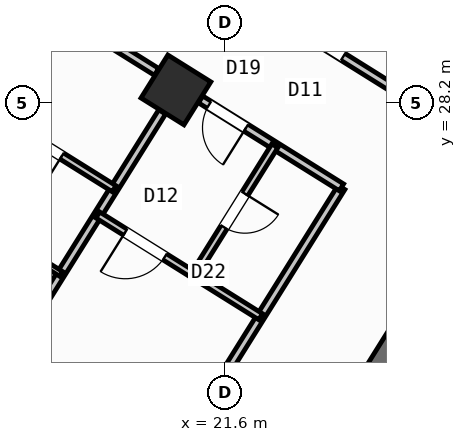
"""IFC4 building model, lengths in metres.
Left out: names, types, materials, properties, quantities, classifications, styles, units other than length and angle.
Written with IfcOpenShell. Run it as: python <this file> out.ifc"""

import sys

from ifc_helpers import new_model, si_unit, direction, frame, frame_2d, origin, origin_2d, place, context, subcontext, project, spatial, rectangle, hollow_rectangle, extrude, source, transform, mapped, element, fill, save


model = new_model("IFC4")
c1 = context("Model", 3, precision=1e-05, world=origin(), true_north=direction((0.0, 1.0)))
c2 = subcontext(c1, "Body", "Model", "MODEL_VIEW")
j1 = project(units=[si_unit("LENGTHUNIT", "METRE"), si_unit("PLANEANGLEUNIT", "RADIAN")], contexts=[c1])
p1 = place(None, origin())
s1 = spatial("IfcSite", under=j1, at=p1, CompositionType="ELEMENT")
p2 = place(p1, origin())
s2 = spatial("IfcBuilding", under=s1, at=p2, CompositionType="ELEMENT")
p3 = place(p2, frame((0.0, 0.0, 67.2)))
s3 = spatial("IfcBuildingStorey", under=s2, at=p3, CompositionType="ELEMENT", Elevation=67.2)
p4 = place(p3, frame((26.007, 24.976, 0.0), z_axis=(0.0, 0.0, 1.0), x_axis=(-0.529916319127, -0.848049936456, 0.0)))
e1 = element("IfcWall", 1, at=p4, inside=s3, PredefinedType="SHEAR", context=c2, shape_type="SweptSolid", body=[
    extrude(rectangle(XDim=6.375, YDim=0.65, at=frame_2d((3.188, 0.0))), origin(), (0.0, 0.0, 1.0), 4.22),
])
m1 = source(origin(), c2, "Body", "SweptSolid", [
    extrude(hollow_rectangle(XDim=1.0, YDim=1.0, WallThickness=0.04, at=origin_2d()), origin(), (0.0, 0.0, 1.0), 4.5),
])
p5 = place(p3, frame((20.632, 28.452, 0.0), z_axis=(0.0, 0.0, 1.0), x_axis=(-0.848048096156, 0.529919264233, 0.0)))
e2 = element("IfcColumn", 2, at=p5, inside=s3, PredefinedType="COLUMN", context=c2, shape_type="MappedRepresentation", body=[
    mapped(m1, transform((0.0, 0.0, 0.0), scale=1.0)),
])
p6 = place(p3, frame((29.268, 6.429, 0.0), z_axis=(0.0, 0.0, 1.0), x_axis=(-0.848049971435, 0.529916263149, 0.0)))
e3 = element("IfcWall", 3, at=p6, inside=s3, PredefinedType="STANDARD", context=c2, shape_type="SweptSolid", body=[
    extrude(rectangle(XDim=31.588, YDim=0.32, at=frame_2d((15.794, 0.0))), origin(), (0.0, 0.0, 1.0), 4.22),
])
p7 = place(p6, frame((16.362, 0.0, 0.0)))
e4 = element("IfcOpeningElement", 4, at=p7, cuts=e3, PredefinedType="OPENING", context=c2, shape_type="SweptSolid", body=[
    extrude(rectangle(XDim=1.2, YDim=2.15, at=frame_2d((0.6, 1.075))), frame((0.0, 0.17, 0.0), z_axis=(0.0, -1.0, 0.0), x_axis=(1.0, 0.0, 0.0)), (0.0, 0.0, 1.0), 0.34),
])
p8 = place(p6, frame((2.989, 0.0, 0.8)))
e5 = element("IfcOpeningElement", 5, at=p8, cuts=e3, PredefinedType="OPENING", context=c2, shape_type="SweptSolid", body=[
    extrude(rectangle(XDim=2.1, YDim=1.55, at=frame_2d((1.05, 0.775))), frame((0.0, 0.17, 0.0), z_axis=(0.0, -1.0, 0.0), x_axis=(1.0, 0.0, 0.0)), (0.0, 0.0, 1.0), 0.34),
])
p9 = place(p6, frame((8.359, 0.0, 0.8)))
e6 = element("IfcOpeningElement", 6, at=p9, cuts=e3, PredefinedType="OPENING", context=c2, shape_type="SweptSolid", body=[
    extrude(rectangle(XDim=2.1, YDim=1.55, at=frame_2d((1.05, 0.775))), frame((0.0, 0.17, 0.0), z_axis=(0.0, -1.0, 0.0), x_axis=(1.0, 0.0, 0.0)), (0.0, 0.0, 1.0), 0.34),
])
p10 = place(p6, frame((13.284, 0.0, 0.95)))
e7 = element("IfcOpeningElement", 7, at=p10, cuts=e3, PredefinedType="OPENING", context=c2, shape_type="SweptSolid", body=[
    extrude(rectangle(XDim=1.2, YDim=1.4, at=frame_2d((0.6, 0.7))), frame((0.0, 0.17, 0.0), z_axis=(0.0, -1.0, 0.0), x_axis=(1.0, 0.0, 0.0)), (0.0, 0.0, 1.0), 0.34),
])
p11 = place(p6, frame((29.188, 0.0, 0.95)))
e8 = element("IfcOpeningElement", 8, at=p11, cuts=e3, PredefinedType="OPENING", context=c2, shape_type="SweptSolid", body=[
    extrude(rectangle(XDim=1.2, YDim=1.4, at=frame_2d((0.6, 0.7))), frame((0.0, 0.17, 0.0), z_axis=(0.0, -1.0, 0.0), x_axis=(1.0, 0.0, 0.0)), (0.0, 0.0, 1.0), 0.34),
])
p12 = place(p6, frame((19.11, 0.0, 1.0)))
e9 = element("IfcOpeningElement", 9, at=p12, cuts=e3, PredefinedType="OPENING", context=c2, shape_type="SweptSolid", body=[
    extrude(rectangle(XDim=0.9, YDim=1.25, at=frame_2d((0.45, 0.625))), frame((0.0, 0.17, 0.0), z_axis=(0.0, -1.0, 0.0), x_axis=(1.0, 0.0, 0.0)), (0.0, 0.0, 1.0), 0.34),
])
p13 = place(p6, frame((21.226, 0.0, 1.0)))
e10 = element("IfcOpeningElement", 10, at=p13, cuts=e3, PredefinedType="OPENING", context=c2, shape_type="SweptSolid", body=[
    extrude(rectangle(XDim=0.9, YDim=1.25, at=frame_2d((0.45, 0.625))), frame((0.0, 0.17, 0.0), z_axis=(0.0, -1.0, 0.0), x_axis=(1.0, 0.0, 0.0)), (0.0, 0.0, 1.0), 0.34),
])
p14 = place(p6, frame((23.014, 0.0, 1.0)))
e11 = element("IfcOpeningElement", 11, at=p14, cuts=e3, PredefinedType="OPENING", context=c2, shape_type="SweptSolid", body=[
    extrude(rectangle(XDim=0.9, YDim=1.25, at=frame_2d((0.45, 0.625))), frame((0.0, 0.17, 0.0), z_axis=(0.0, -1.0, 0.0), x_axis=(1.0, 0.0, 0.0)), (0.0, 0.0, 1.0), 0.34),
])
p15 = place(p6, frame((24.802, 0.0, 1.0)))
e12 = element("IfcOpeningElement", 12, at=p15, cuts=e3, PredefinedType="OPENING", context=c2, shape_type="SweptSolid", body=[
    extrude(rectangle(XDim=0.9, YDim=1.25, at=frame_2d((0.45, 0.625))), frame((0.0, 0.17, 0.0), z_axis=(0.0, -1.0, 0.0), x_axis=(1.0, 0.0, 0.0)), (0.0, 0.0, 1.0), 0.34),
])
p16 = place(p6, frame((26.59, 0.0, 1.0)))
e13 = element("IfcOpeningElement", 13, at=p16, cuts=e3, PredefinedType="OPENING", context=c2, shape_type="SweptSolid", body=[
    extrude(rectangle(XDim=0.9, YDim=1.25, at=frame_2d((0.45, 0.625))), frame((0.0, 0.17, 0.0), z_axis=(0.0, -1.0, 0.0), x_axis=(1.0, 0.0, 0.0)), (0.0, 0.0, 1.0), 0.34),
])
p17 = place(p3, frame((14.138, 41.825, 0.0), z_axis=(0.0, 0.0, 1.0), x_axis=(0.848046498049, -0.529921821731, 0.0)))
e14 = element("IfcWall", 14, at=p17, inside=s3, PredefinedType="STANDARD", context=c2, shape_type="SweptSolid", body=[
    extrude(rectangle(XDim=31.588, YDim=0.32, at=frame_2d((15.794, 0.0))), origin(), (0.0, 0.0, 1.0), 4.22),
])
p18 = place(p17, frame((2.526, 0.0, 0.0)))
e15 = element("IfcOpeningElement", 15, at=p18, cuts=e14, PredefinedType="OPENING", context=c2, shape_type="SweptSolid", body=[
    extrude(rectangle(XDim=1.05, YDim=2.15, at=frame_2d((0.525, 1.075))), frame((0.0, 0.17, 0.0), z_axis=(0.0, -1.0, 0.0), x_axis=(1.0, 0.0, 0.0)), (0.0, 0.0, 1.0), 0.34),
])
p19 = place(p17, frame((9.364, 0.0, 0.95)))
e16 = element("IfcOpeningElement", 16, at=p19, cuts=e14, PredefinedType="OPENING", context=c2, shape_type="SweptSolid", body=[
    extrude(rectangle(XDim=1.2, YDim=1.4, at=frame_2d((0.6, 0.7))), frame((0.0, 0.17, 0.0), z_axis=(0.0, -1.0, 0.0), x_axis=(1.0, 0.0, 0.0)), (0.0, 0.0, 1.0), 0.34),
])
p20 = place(p17, frame((14.636, 0.0, 1.0)))
e17 = element("IfcOpeningElement", 17, at=p20, cuts=e14, PredefinedType="OPENING", context=c2, shape_type="SweptSolid", body=[
    extrude(rectangle(XDim=0.9, YDim=1.25, at=frame_2d((0.45, 0.625))), frame((0.0, 0.17, 0.0), z_axis=(0.0, -1.0, 0.0), x_axis=(1.0, 0.0, 0.0)), (0.0, 0.0, 1.0), 0.34),
])
p21 = place(p17, frame((22.306, 0.0, 0.85)))
e18 = element("IfcOpeningElement", 18, at=p21, cuts=e14, PredefinedType="OPENING", context=c2, shape_type="SweptSolid", body=[
    extrude(rectangle(XDim=1.5, YDim=1.5, at=frame_2d((0.75, 0.75))), frame((0.0, 0.17, 0.0), z_axis=(0.0, -1.0, 0.0), x_axis=(1.0, 0.0, 0.0)), (0.0, 0.0, 1.0), 0.34),
])
p22 = place(p17, frame((26.981, 0.0, 0.85)))
e19 = element("IfcOpeningElement", 19, at=p22, cuts=e14, PredefinedType="OPENING", context=c2, shape_type="SweptSolid", body=[
    extrude(rectangle(XDim=1.5, YDim=1.5, at=frame_2d((0.75, 0.75))), frame((0.0, 0.17, 0.0), z_axis=(0.0, -1.0, 0.0), x_axis=(1.0, 0.0, 0.0)), (0.0, 0.0, 1.0), 0.34),
])
p23 = place(p3, frame((23.899, 26.529, 0.0), z_axis=(0.0, 0.0, 1.0), x_axis=(-0.529917716469, -0.848049063305, 0.0)))
e20 = element("IfcWall", 20, at=p23, inside=s3, PredefinedType="PARTITIONING", context=c2, shape_type="SweptSolid", body=[
    extrude(rectangle(XDim=14.05, YDim=0.16, at=frame_2d((7.025, 0.0))), origin(), (0.0, 0.0, 1.0), 4.21),
])
p24 = place(p3, frame((25.065, 28.394, 0.0), z_axis=(0.0, 0.0, 1.0), x_axis=(-0.848048310262, 0.529918921593, 0.0)))
e21 = element("IfcWall", 21, at=p24, inside=s3, PredefinedType="PARTITIONING", context=c2, shape_type="SweptSolid", body=[
    extrude(rectangle(XDim=16.73, YDim=0.16, at=frame_2d((8.365, 0.0))), origin(), (0.0, 0.0, 1.0), 4.21),
])
p25 = place(p24, frame((1.338, 0.0, 0.0)))
e22 = element("IfcOpeningElement", 22, at=p25, cuts=e21, PredefinedType="OPENING", context=c2, shape_type="SweptSolid", body=[
    extrude(rectangle(XDim=1.0, YDim=2.1, at=frame_2d((0.5, 1.05))), frame((0.0, 0.09, 0.0), z_axis=(0.0, -1.0, 0.0), x_axis=(1.0, 0.0, 0.0)), (0.0, 0.0, 1.0), 0.18),
])
p26 = place(p24, frame((5.265, 0.0, 0.0)))
e23 = element("IfcOpeningElement", 23, at=p26, cuts=e21, PredefinedType="OPENING", context=c2, shape_type="SweptSolid", body=[
    extrude(rectangle(XDim=1.0, YDim=2.1, at=frame_2d((0.5, 1.05))), frame((0.0, 0.09, 0.0), z_axis=(0.0, -1.0, 0.0), x_axis=(1.0, 0.0, 0.0)), (0.0, 0.0, 1.0), 0.18),
])
p27 = place(p24, frame((9.526, 0.0, 0.0)))
e24 = element("IfcOpeningElement", 24, at=p27, cuts=e21, PredefinedType="OPENING", context=c2, shape_type="SweptSolid", body=[
    extrude(rectangle(XDim=1.0, YDim=2.1, at=frame_2d((0.5, 1.05))), frame((0.0, 0.09, 0.0), z_axis=(0.0, -1.0, 0.0), x_axis=(1.0, 0.0, 0.0)), (0.0, 0.0, 1.0), 0.18),
])
p28 = place(p24, frame((13.954, 0.0, 0.0)))
e25 = element("IfcOpeningElement", 25, at=p28, cuts=e21, PredefinedType="OPENING", context=c2, shape_type="SweptSolid", body=[
    extrude(rectangle(XDim=1.0, YDim=2.1, at=frame_2d((0.5, 1.05))), frame((0.0, 0.09, 0.0), z_axis=(0.0, -1.0, 0.0), x_axis=(1.0, 0.0, 0.0)), (0.0, 0.0, 1.0), 0.18),
])
p29 = place(p3, frame((23.899, 26.529, 0.0), z_axis=(0.0, 0.0, 1.0), x_axis=(-0.848061058944, 0.529898518871, 0.0)))
e26 = element("IfcWall", 26, at=p29, inside=s3, PredefinedType="PARTITIONING", context=c2, shape_type="SweptSolid", body=[
    extrude(rectangle(XDim=3.278, YDim=0.16, at=frame_2d((1.639, 0.0))), origin(), (0.0, 0.0, 1.0), 3.595),
])
p30 = place(p29, frame((2.22, 0.0, 0.0)))
e27 = element("IfcOpeningElement", 27, at=p30, cuts=e26, PredefinedType="OPENING", context=c2, shape_type="SweptSolid", body=[
    extrude(rectangle(XDim=0.86, YDim=2.05, at=frame_2d((0.43, 1.025))), frame((0.0, 0.09, 0.0), z_axis=(0.0, -1.0, 0.0), x_axis=(1.0, 0.0, 0.0)), (0.0, 0.0, 1.0), 0.18),
])
p31 = place(p3, frame((20.251, 28.808, 0.0), z_axis=(0.0, 0.0, 1.0), x_axis=(-0.848044224181, 0.529925460639, 0.0)))
e28 = element("IfcWall", 28, at=p31, inside=s3, PredefinedType="PARTITIONING", context=c2, shape_type="SweptSolid", body=[
    extrude(rectangle(XDim=5.376, YDim=0.16, at=frame_2d((2.688, 0.0))), origin(), (0.0, 0.0, 1.0), 3.595),
])
p32 = place(p3, frame((20.361, 28.018, 0.0), z_axis=(0.0, 0.0, 1.0), x_axis=(-0.529915015264, -0.848050751193, 0.0)))
e29 = element("IfcWall", 29, at=p32, inside=s3, PredefinedType="PARTITIONING", context=c2, shape_type="SweptSolid", body=[
    extrude(rectangle(XDim=6.276, YDim=0.16, at=frame_2d((3.138, 0.0))), origin(), (0.0, 0.0, 1.0), 2.395),
])
p33 = place(p3, frame((22.304, 23.976, 0.0), z_axis=(0.0, 0.0, 1.0), x_axis=(-0.84803087207, 0.529946827537, 0.0)))
e30 = element("IfcWall", 30, at=p33, inside=s3, PredefinedType="PLUMBINGWALL", context=c2, shape_type="SweptSolid", body=[
    extrude(rectangle(XDim=3.79, YDim=0.14, at=frame_2d((1.895, 0.0))), origin(), (0.0, 0.0, 1.0), 4.21),
])
p34 = place(p33, frame((2.23, 0.0, 0.0)))
e31 = element("IfcOpeningElement", 31, at=p34, cuts=e30, PredefinedType="OPENING", context=c2, shape_type="SweptSolid", body=[
    extrude(rectangle(XDim=0.92, YDim=2.08, at=frame_2d((0.46, 1.04))), frame((0.0, 0.08, 0.0), z_axis=(0.0, -1.0, 0.0), x_axis=(1.0, 0.0, 0.0)), (0.0, 0.0, 1.0), 0.16),
])
p35 = place(p3, frame((22.585, 27.35, 0.0), z_axis=(0.0, 0.0, 1.0), x_axis=(-0.529977067289, -0.848011974059, 0.0)))
e32 = element("IfcWall", 32, at=p35, inside=s3, PredefinedType="PLUMBINGWALL", context=c2, shape_type="SweptSolid", body=[
    extrude(rectangle(XDim=3.01, YDim=0.14, at=frame_2d((1.505, 0.0))), origin(), (0.0, 0.0, 1.0), 3.865),
])
p36 = place(p35, frame((1.115, 0.0, 0.0)))
e33 = element("IfcOpeningElement", 33, at=p36, cuts=e32, PredefinedType="OPENING", context=c2, shape_type="SweptSolid", body=[
    extrude(rectangle(XDim=0.78, YDim=2.05, at=frame_2d((0.39, 1.025))), frame((0.0, 0.08, 0.0), z_axis=(0.0, -1.0, 0.0), x_axis=(1.0, 0.0, 0.0)), (0.0, 0.0, 1.0), 0.16),
])
p37 = place(p3, frame((19.413, 26.501, 0.0), z_axis=(0.0, 0.0, 1.0), x_axis=(-0.848051995289, 0.529913024266, 0.0)))
e34 = element("IfcWall", 34, at=p37, inside=s3, PredefinedType="PLUMBINGWALL", context=c2, shape_type="SweptSolid", body=[
    extrude(rectangle(XDim=8.94, YDim=0.14, at=frame_2d((4.47, 0.0))), origin(), (0.0, 0.0, 1.0), 4.21),
])
p38 = place(p37, frame((5.688, 0.0, 0.0)))
e35 = element("IfcOpeningElement", 35, at=p38, cuts=e34, PredefinedType="OPENING", context=c2, shape_type="SweptSolid", body=[
    extrude(rectangle(XDim=0.78, YDim=2.05, at=frame_2d((0.39, 1.025))), frame((0.0, 0.08, 0.0), z_axis=(0.0, -1.0, 0.0), x_axis=(1.0, 0.0, 0.0)), (0.0, 0.0, 1.0), 0.16),
])
p39 = place(p37, frame((1.218, 0.0, 0.0)))
e36 = element("IfcOpeningElement", 36, at=p39, cuts=e34, PredefinedType="OPENING", context=c2, shape_type="SweptSolid", body=[
    extrude(rectangle(XDim=0.78, YDim=2.05, at=frame_2d((0.39, 1.025))), frame((0.0, 0.08, 0.0), z_axis=(0.0, -1.0, 0.0), x_axis=(1.0, 0.0, 0.0)), (0.0, 0.0, 1.0), 0.16),
])
p40 = place(p3, frame((18.364, 24.823, 0.0), z_axis=(0.0, 0.0, 1.0), x_axis=(-0.848056599187, 0.529905656296, 0.0)))
e37 = element("IfcWall", 37, at=p40, inside=s3, PredefinedType="PARTITIONING", context=c2, shape_type="SweptSolid", body=[
    extrude(rectangle(XDim=8.94, YDim=0.11, at=frame_2d((4.47, 0.0))), origin(), (0.0, 0.0, 1.0), 4.21),
])
p41 = place(p40, frame((0.434, 0.0, 0.0)))
e38 = element("IfcOpeningElement", 38, at=p41, cuts=e37, PredefinedType="OPENING", context=c2, shape_type="SweptSolid", body=[
    extrude(rectangle(XDim=0.92, YDim=2.08, at=frame_2d((0.46, 1.04))), frame((0.0, 0.065, 0.0), z_axis=(0.0, -1.0, 0.0), x_axis=(1.0, 0.0, 0.0)), (0.0, 0.0, 1.0), 0.13),
])
p42 = place(p40, frame((2.222, 0.0, 0.0)))
e39 = element("IfcOpeningElement", 39, at=p42, cuts=e37, PredefinedType="OPENING", context=c2, shape_type="SweptSolid", body=[
    extrude(rectangle(XDim=0.92, YDim=2.08, at=frame_2d((0.46, 1.04))), frame((0.0, 0.065, 0.0), z_axis=(0.0, -1.0, 0.0), x_axis=(1.0, 0.0, 0.0)), (0.0, 0.0, 1.0), 0.13),
])
p43 = place(p40, frame((4.01, 0.0, 0.0)))
e40 = element("IfcOpeningElement", 40, at=p43, cuts=e37, PredefinedType="OPENING", context=c2, shape_type="SweptSolid", body=[
    extrude(rectangle(XDim=0.92, YDim=2.08, at=frame_2d((0.46, 1.04))), frame((0.0, 0.065, 0.0), z_axis=(0.0, -1.0, 0.0), x_axis=(1.0, 0.0, 0.0)), (0.0, 0.0, 1.0), 0.13),
])
p44 = place(p40, frame((5.798, 0.0, 0.0)))
e41 = element("IfcOpeningElement", 41, at=p44, cuts=e37, PredefinedType="OPENING", context=c2, shape_type="SweptSolid", body=[
    extrude(rectangle(XDim=0.92, YDim=2.08, at=frame_2d((0.46, 1.04))), frame((0.0, 0.065, 0.0), z_axis=(0.0, -1.0, 0.0), x_axis=(1.0, 0.0, 0.0)), (0.0, 0.0, 1.0), 0.13),
])
p45 = place(p40, frame((7.586, 0.0, 0.0)))
e42 = element("IfcOpeningElement", 42, at=p45, cuts=e37, PredefinedType="OPENING", context=c2, shape_type="SweptSolid", body=[
    extrude(rectangle(XDim=0.92, YDim=2.08, at=frame_2d((0.46, 1.04))), frame((0.0, 0.065, 0.0), z_axis=(0.0, -1.0, 0.0), x_axis=(1.0, 0.0, 0.0)), (0.0, 0.0, 1.0), 0.13),
])
m2 = source(origin(), c2, "Body", "SweptSolid", [
    extrude(rectangle(XDim=0.86, YDim=2.05, at=frame_2d((0.43, 1.025))), frame((0.0, 0.025, 0.0), z_axis=(0.0, -1.0, 0.0), x_axis=(1.0, 0.0, 0.0)), (0.0, 0.0, 1.0), 0.05),
])
p46 = place(p30, origin())
e43 = element("IfcDoor", 43, at=p46, inside=s3, OperationType="SINGLE_SWING_LEFT", PredefinedType="DOOR", context=c2, shape_type="MappedRepresentation", body=[
    mapped(m2, transform((0.0, 0.0, 0.0), scale=1.0)),
])
fill(e27, e43)
m3 = source(origin(), c2, "Body", "SweptSolid", [
    extrude(rectangle(XDim=0.92, YDim=2.08, at=frame_2d((0.46, 1.04))), frame((0.0, 0.025, 0.0), z_axis=(0.0, -1.0, 0.0), x_axis=(1.0, 0.0, 0.0)), (0.0, 0.0, 1.0), 0.05),
])
p47 = place(p34, origin())
e44 = element("IfcDoor", 44, at=p47, inside=s3, OperationType="SINGLE_SWING_RIGHT", PredefinedType="DOOR", context=c2, shape_type="MappedRepresentation", body=[
    mapped(m3, transform((0.0, 0.0, 0.0), scale=1.0)),
])
fill(e31, e44)
m4 = source(origin(), c2, "Body", "SweptSolid", [
    extrude(rectangle(XDim=0.78, YDim=2.05, at=frame_2d((0.39, 1.025))), frame((0.0, 0.025, 0.0), z_axis=(0.0, -1.0, 0.0), x_axis=(1.0, 0.0, 0.0)), (0.0, 0.0, 1.0), 0.05),
])
p48 = place(p36, origin())
e45 = element("IfcDoor", 45, at=p48, inside=s3, OperationType="SINGLE_SWING_LEFT", PredefinedType="DOOR", context=c2, shape_type="MappedRepresentation", body=[
    mapped(m4, transform((0.0, 0.0, 0.0), scale=1.0)),
])
fill(e33, e45)
p49 = place(p39, origin())
e46 = element("IfcDoor", 46, at=p49, inside=s3, OperationType="SINGLE_SWING_LEFT", PredefinedType="DOOR", context=c2, shape_type="MappedRepresentation", body=[
    mapped(m4, transform((0.0, 0.0, 0.0), scale=1.0)),
])
fill(e36, e46)
m5 = source(origin(), c2, "Body", "SweptSolid", [
    extrude(rectangle(XDim=1.0, YDim=2.1, at=frame_2d((0.5, 1.05))), frame((0.0, 0.025, 0.0), z_axis=(0.0, -1.0, 0.0), x_axis=(1.0, 0.0, 0.0)), (0.0, 0.0, 1.0), 0.05),
])
p50 = place(p25, frame((1.0, 0.0, 0.0), z_axis=(0.0, 0.0, 1.0), x_axis=(-1.0, 0.0, 0.0)))
e47 = element("IfcDoor", 47, at=p50, inside=s3, OperationType="SINGLE_SWING_LEFT", PredefinedType="DOOR", context=c2, shape_type="MappedRepresentation", body=[
    mapped(m5, transform((0.0, 0.0, 0.0), scale=1.0)),
])
fill(e22, e47)
save(model, sys.argv[1])
